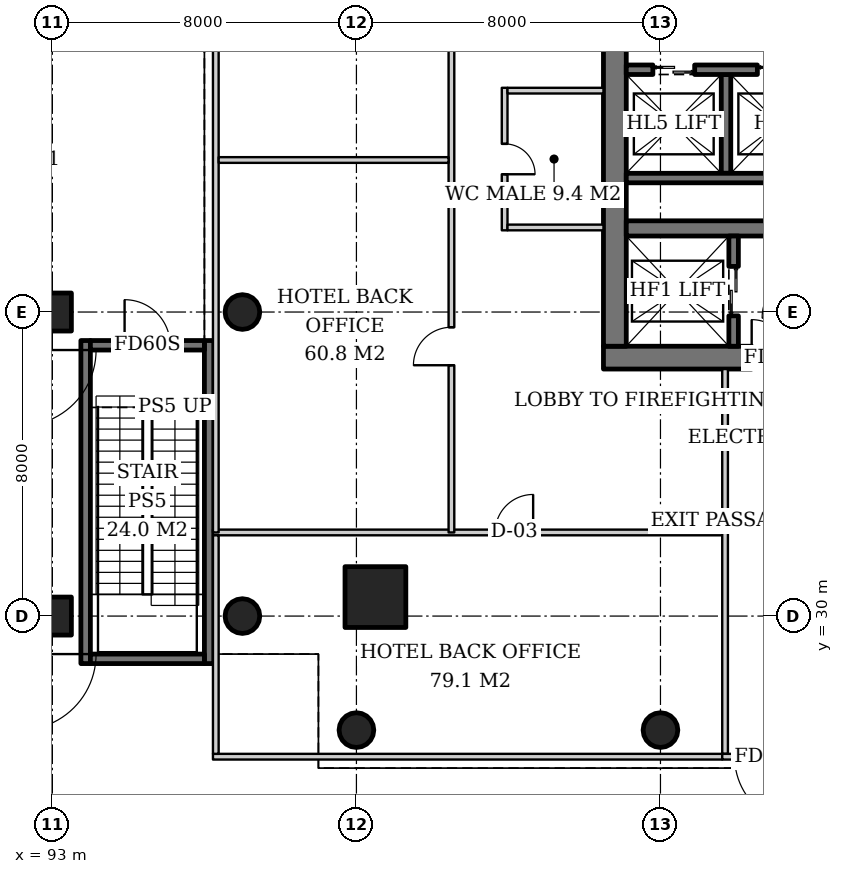
"""IFC4 building model, lengths in metres.
Left out: names, types, materials, properties, quantities, classifications, styles, units other than length and angle.
Written with IfcOpenShell. Run it as: python <this file> out.ifc"""

import sys

from ifc_helpers import new_model, si_unit, direction, frame, frame_2d, origin, origin_2d, place, context, subcontext, project, spatial, rectangle, hollow_circle, extrude, element, fill, save


model = new_model("IFC4")
c1 = context("Model", 3, precision=1e-05, world=origin(), true_north=direction((0.0, 1.0)))
c2 = subcontext(c1, "Body", "Model", "MODEL_VIEW")
j1 = project(units=[si_unit("LENGTHUNIT", "METRE"), si_unit("PLANEANGLEUNIT", "RADIAN")], contexts=[c1])
p1 = place(None, origin())
s1 = spatial("IfcSite", under=j1, at=p1, CompositionType="ELEMENT")
p2 = place(p1, origin())
s2 = spatial("IfcBuilding", under=s1, at=p2, CompositionType="ELEMENT")
p3 = place(p2, origin())
s3 = spatial("IfcBuildingStorey", under=s2, at=p3, CompositionType="ELEMENT", Elevation=0.0)
for number, where, z_axis, x_axis in (
    (1, (93.0, 30.0, 0.0), (0.0, 0.0, 1.0), (1.0, 0.0, 0.0)),
    (2, (93.0, 38.0, 0.0), (0.0, 0.0, 1.0), (1.0, 0.0, 0.0)),
):
    element("IfcColumn", number, at=place(p3, frame(where, z_axis=z_axis, x_axis=x_axis)), inside=s3, PredefinedType="COLUMN", context=c2, shape_type="SweptSolid", body=[
        extrude(rectangle(XDim=1.0, YDim=1.0, at=origin_2d()), origin(), (0.0, 0.0, 1.0), 6.0),
    ])
p4 = place(p3, frame((101.5, 30.5, 0.0), z_axis=(0.0, 0.0, 1.0), x_axis=(1.0, 0.0, 0.0)))
e3 = element("IfcColumn", 3, at=p4, inside=s3, PredefinedType="COLUMN", context=c2, shape_type="SweptSolid", body=[
    extrude(rectangle(XDim=1.6, YDim=1.6, at=origin_2d()), origin(), (0.0, 0.0, 1.0), 6.0),
])
for number, where, z_axis, x_axis in (
    (4, (98.0, 30.0, 0.0), (0.0, 0.0, 1.0), (1.0, 0.0, 0.0)),
    (5, (98.0, 38.0, 0.0), (0.0, 0.0, 1.0), (1.0, 0.0, 0.0)),
    (6, (101.0, 27.0, 0.0), (0.0, 0.0, 1.0), (1.0, 0.0, 0.0)),
    (7, (109.0, 27.0, 0.0), (0.0, 0.0, 1.0), (1.0, 0.0, 0.0)),
):
    element("IfcColumn", number, at=place(p3, frame(where, z_axis=z_axis, x_axis=x_axis)), inside=s3, PredefinedType="COLUMN", context=c2, shape_type="SweptSolid", body=[
        extrude(hollow_circle(Radius=0.457, WallThickness=0.03, at=origin_2d()), origin(), (0.0, 0.0, 1.0), 6.0),
    ])
p5 = place(p3, frame((107.5, 36.8, 0.0), z_axis=(0.0, 0.0, 1.0), x_axis=(1.0, 0.0, 0.0)))
e8 = element("IfcWall", 8, at=p5, inside=s3, PredefinedType="SHEAR", context=c2, shape_type="SweptSolid", body=[
    extrude(rectangle(XDim=19.0, YDim=0.6, at=frame_2d((9.5, 0.0))), origin(), (0.0, 0.0, 1.0), 6.0),
])
p6 = place(p5, frame((3.9, 0.0, 0.0)))
e9 = element("IfcOpeningElement", 9, at=p6, cuts=e8, PredefinedType="OPENING", context=c2, shape_type="SweptSolid", body=[
    extrude(rectangle(XDim=1.0, YDim=2.1, at=frame_2d((0.5, 1.05))), frame((0.0, 0.31, 0.0), z_axis=(0.0, -1.0, 0.0), x_axis=(1.0, 0.0, 0.0)), (0.0, 0.0, 1.0), 0.62),
])
p7 = place(p5, frame((14.107, 0.0, 0.0)))
e10 = element("IfcOpeningElement", 10, at=p7, cuts=e8, PredefinedType="OPENING", context=c2, shape_type="SweptSolid", body=[
    extrude(rectangle(XDim=1.0, YDim=2.1, at=frame_2d((0.5, 1.05))), frame((0.0, 0.31, 0.0), z_axis=(0.0, -1.0, 0.0), x_axis=(1.0, 0.0, 0.0)), (0.0, 0.0, 1.0), 0.62),
])
p8 = place(p5, frame((15.638, 0.0, 0.0)))
e11 = element("IfcOpeningElement", 11, at=p8, cuts=e8, PredefinedType="OPENING", context=c2, shape_type="SweptSolid", body=[
    extrude(rectangle(XDim=1.0, YDim=2.1, at=frame_2d((0.5, 1.05))), frame((0.0, 0.31, 0.0), z_axis=(0.0, -1.0, 0.0), x_axis=(1.0, 0.0, 0.0)), (0.0, 0.0, 1.0), 0.62),
])
p9 = place(p5, frame((17.142, 0.0, 0.0)))
e12 = element("IfcOpeningElement", 12, at=p9, cuts=e8, PredefinedType="OPENING", context=c2, shape_type="SweptSolid", body=[
    extrude(rectangle(XDim=1.0, YDim=2.1, at=frame_2d((0.5, 1.05))), frame((0.0, 0.31, 0.0), z_axis=(0.0, -1.0, 0.0), x_axis=(1.0, 0.0, 0.0)), (0.0, 0.0, 1.0), 0.62),
])
p10 = place(p3, frame((107.8, 37.1, 0.0), z_axis=(0.0, 0.0, 1.0), x_axis=(0.0, 1.0, 0.0)))
e13 = element("IfcWall", 13, at=p10, inside=s3, PredefinedType="SHEAR", context=c2, shape_type="SweptSolid", body=[
    extrude(rectangle(XDim=17.8, YDim=0.6, at=frame_2d((8.9, 0.0))), origin(), (0.0, 0.0, 1.0), 6.0),
])
p11 = place(p10, frame((8.0, 0.0, 0.0)))
e14 = element("IfcOpeningElement", 14, at=p11, cuts=e13, PredefinedType="OPENING", context=c2, shape_type="SweptSolid", body=[
    extrude(rectangle(XDim=1.8, YDim=2.4, at=frame_2d((0.9, 1.2))), frame((0.0, 0.31, 0.0), z_axis=(0.0, -1.0, 0.0), x_axis=(1.0, 0.0, 0.0)), (0.0, 0.0, 1.0), 0.62),
])
p12 = place(p3, frame((108.1, 40.2, 0.0), z_axis=(0.0, 0.0, 1.0), x_axis=(1.0, 0.0, 0.0)))
e15 = element("IfcWall", 15, at=p12, inside=s3, PredefinedType="SHEAR", context=c2, shape_type="SweptSolid", body=[
    extrude(rectangle(XDim=17.8, YDim=0.4, at=frame_2d((8.9, 0.0))), origin(), (0.0, 0.0, 1.0), 6.0),
])
p13 = place(p3, frame((110.925, 37.1, 0.0), z_axis=(0.0, 0.0, 1.0), x_axis=(0.0, 1.0, 0.0)))
e16 = element("IfcWall", 16, at=p13, inside=s3, PredefinedType="SHEAR", context=c2, shape_type="SweptSolid", body=[
    extrude(rectangle(XDim=2.9, YDim=0.25, at=frame_2d((1.45, 0.0))), origin(), (0.0, 0.0, 1.0), 6.0),
])
p14 = place(p13, frame((0.8, 0.0, 0.0)))
e17 = element("IfcOpeningElement", 17, at=p14, cuts=e16, PredefinedType="OPENING", context=c2, shape_type="SweptSolid", body=[
    extrude(rectangle(XDim=1.3, YDim=2.2, at=frame_2d((0.65, 1.1))), frame((0.0, 0.135, 0.0), z_axis=(0.0, -1.0, 0.0), x_axis=(1.0, 0.0, 0.0)), (0.0, 0.0, 1.0), 0.27),
])
p15 = place(p3, frame((110.725, 44.25, 0.0), z_axis=(0.0, 0.0, 1.0), x_axis=(0.0, -1.0, 0.0)))
e18 = element("IfcWall", 18, at=p15, inside=s3, PredefinedType="SHEAR", context=c2, shape_type="SweptSolid", body=[
    extrude(rectangle(XDim=2.6, YDim=0.25, at=frame_2d((1.3, 0.0))), origin(), (0.0, 0.0, 1.0), 6.0),
])
p16 = place(p3, frame((108.1, 41.525, 0.0), z_axis=(0.0, 0.0, 1.0), x_axis=(1.0, 0.0, 0.0)))
e19 = element("IfcWall", 19, at=p16, inside=s3, PredefinedType="SHEAR", context=c2, shape_type="SweptSolid", body=[
    extrude(rectangle(XDim=11.0, YDim=0.25, at=frame_2d((5.5, 0.0))), origin(), (0.0, 0.0, 1.0), 6.0),
])
p17 = place(p3, frame((108.1, 44.375, 0.0), z_axis=(0.0, 0.0, 1.0), x_axis=(1.0, 0.0, 0.0)))
e20 = element("IfcWall", 20, at=p17, inside=s3, PredefinedType="SHEAR", context=c2, shape_type="SweptSolid", body=[
    extrude(rectangle(XDim=12.83, YDim=0.25, at=frame_2d((6.415, 0.0))), origin(), (0.0, 0.0, 1.0), 6.0),
])
p18 = place(p17, frame((0.7, 0.0, 0.0)))
e21 = element("IfcOpeningElement", 21, at=p18, cuts=e20, PredefinedType="OPENING", context=c2, shape_type="SweptSolid", body=[
    extrude(rectangle(XDim=1.1, YDim=2.2, at=frame_2d((0.55, 1.1))), frame((0.0, 0.135, 0.0), z_axis=(0.0, -1.0, 0.0), x_axis=(1.0, 0.0, 0.0)), (0.0, 0.0, 1.0), 0.27),
])
p19 = place(p17, frame((3.45, 0.0, 0.0)))
e22 = element("IfcOpeningElement", 22, at=p19, cuts=e20, PredefinedType="OPENING", context=c2, shape_type="SweptSolid", body=[
    extrude(rectangle(XDim=1.1, YDim=2.2, at=frame_2d((0.55, 1.1))), frame((0.0, 0.135, 0.0), z_axis=(0.0, -1.0, 0.0), x_axis=(1.0, 0.0, 0.0)), (0.0, 0.0, 1.0), 0.27),
])
p20 = place(p17, frame((6.2, 0.0, 0.0)))
e23 = element("IfcOpeningElement", 23, at=p20, cuts=e20, PredefinedType="OPENING", context=c2, shape_type="SweptSolid", body=[
    extrude(rectangle(XDim=1.1, YDim=2.2, at=frame_2d((0.55, 1.1))), frame((0.0, 0.135, 0.0), z_axis=(0.0, -1.0, 0.0), x_axis=(1.0, 0.0, 0.0)), (0.0, 0.0, 1.0), 0.27),
])
p21 = place(p17, frame((9.0, 0.0, 0.0)))
e24 = element("IfcOpeningElement", 24, at=p21, cuts=e20, PredefinedType="OPENING", context=c2, shape_type="SweptSolid", body=[
    extrude(rectangle(XDim=1.0, YDim=2.1, at=frame_2d((0.5, 1.05))), frame((0.0, 0.135, 0.0), z_axis=(0.0, -1.0, 0.0), x_axis=(1.0, 0.0, 0.0)), (0.0, 0.0, 1.0), 0.27),
])
p22 = place(p17, frame((11.515, 0.0, 0.0)))
e25 = element("IfcOpeningElement", 25, at=p22, cuts=e20, PredefinedType="OPENING", context=c2, shape_type="SweptSolid", body=[
    extrude(rectangle(XDim=0.8, YDim=2.0, at=frame_2d((0.4, 1.0))), frame((0.0, 0.135, 0.0), z_axis=(0.0, -1.0, 0.0), x_axis=(1.0, 0.0, 0.0)), (0.0, 0.0, 1.0), 0.27),
])
for number, where, z_axis, x_axis in (
    (26, (93.875, 28.75, 0.0), (0.0, 0.0, 1.0), (0.0, 1.0, 0.0)),
    (27, (97.125, 28.75, 0.0), (0.0, 0.0, 1.0), (0.0, 1.0, 0.0)),
):
    element("IfcWall", number, at=place(p3, frame(where, z_axis=z_axis, x_axis=x_axis)), inside=s3, PredefinedType="SOLIDWALL", context=c2, shape_type="SweptSolid", body=[
        extrude(rectangle(XDim=8.5, YDim=0.25, at=frame_2d((4.25, 0.0))), origin(), (0.0, 0.0, 1.0), 5.7),
    ])
p23 = place(p3, frame((94.0, 28.875, 0.0), z_axis=(0.0, 0.0, 1.0), x_axis=(1.0, 0.0, 0.0)))
e28 = element("IfcWall", 28, at=p23, inside=s3, PredefinedType="SOLIDWALL", context=c2, shape_type="SweptSolid", body=[
    extrude(rectangle(XDim=3.0, YDim=0.25, at=frame_2d((1.5, 0.0))), origin(), (0.0, 0.0, 1.0), 5.7),
])
p24 = place(p3, frame((94.0, 37.125, 0.0), z_axis=(0.0, 0.0, 1.0), x_axis=(1.0, 0.0, 0.0)))
e29 = element("IfcWall", 29, at=p24, inside=s3, PredefinedType="SOLIDWALL", context=c2, shape_type="SweptSolid", body=[
    extrude(rectangle(XDim=3.0, YDim=0.25, at=frame_2d((1.5, 0.0))), origin(), (0.0, 0.0, 1.0), 5.7),
])
p25 = place(p24, frame((0.9, 0.0, 0.0)))
e30 = element("IfcOpeningElement", 30, at=p25, cuts=e29, PredefinedType="OPENING", context=c2, shape_type="SweptSolid", body=[
    extrude(rectangle(XDim=1.2, YDim=2.1, at=frame_2d((0.6, 1.05))), frame((0.0, 0.135, 0.0), z_axis=(0.0, -1.0, 0.0), x_axis=(1.0, 0.0, 0.0)), (0.0, 0.0, 1.0), 0.27),
])
p26 = place(p3, frame((104.9, 43.9, 0.0), z_axis=(0.0, 0.0, 1.0), x_axis=(0.0, -1.0, 0.0)))
e31 = element("IfcWall", 31, at=p26, inside=s3, PredefinedType="PARTITIONING", context=c2, shape_type="SweptSolid", body=[
    extrude(rectangle(XDim=3.75, YDim=0.15, at=frame_2d((1.875, 0.0))), origin(), (0.0, 0.0, 1.0), 4.947),
])
p27 = place(p26, frame((1.475, 0.0, 0.0)))
e32 = element("IfcOpeningElement", 32, at=p27, cuts=e31, PredefinedType="OPENING", context=c2, shape_type="SweptSolid", body=[
    extrude(rectangle(XDim=0.8, YDim=2.1, at=frame_2d((0.4, 1.05))), frame((0.0, 0.085, 0.0), z_axis=(0.0, -1.0, 0.0), x_axis=(1.0, 0.0, 0.0)), (0.0, 0.0, 1.0), 0.17),
])
for number, where, z_axis, x_axis in (
    (33, (104.975, 43.825, 0.0), (0.0, 0.0, 1.0), (1.0, 0.0, 0.0)),
    (34, (104.975, 40.225, 0.0), (0.0, 0.0, 1.0), (1.0, 0.0, 0.0)),
):
    element("IfcWall", number, at=place(p3, frame(where, z_axis=z_axis, x_axis=x_axis)), inside=s3, PredefinedType="PARTITIONING", context=c2, shape_type="SweptSolid", body=[
        extrude(rectangle(XDim=2.525, YDim=0.15, at=frame_2d((1.262, 0.0))), origin(), (0.0, 0.0, 1.0), 5.7),
    ])
p28 = place(p3, frame((97.225, 26.3, 0.0), z_axis=(0.0, 0.0, 1.0), x_axis=(1.0, 0.0, 0.0)))
e35 = element("IfcWall", 35, at=p28, inside=s3, PredefinedType="PARTITIONING", context=c2, shape_type="SweptSolid", body=[
    extrude(rectangle(XDim=13.4, YDim=0.15, at=frame_2d((6.7, 0.0))), origin(), (0.0, 0.0, 1.0), 5.7),
])
p29 = place(p3, frame((97.225, 32.2, 0.0), z_axis=(0.0, 0.0, 1.0), x_axis=(1.0, 0.0, 0.0)))
e36 = element("IfcWall", 36, at=p29, inside=s3, PredefinedType="PARTITIONING", context=c2, shape_type="SweptSolid", body=[
    extrude(rectangle(XDim=13.4, YDim=0.15, at=frame_2d((6.7, 0.0))), origin(), (0.0, 0.0, 1.0), 4.9),
])
p30 = place(p29, frame((7.425, 0.0, 0.0)))
e37 = element("IfcOpeningElement", 37, at=p30, cuts=e36, PredefinedType="OPENING", context=c2, shape_type="SweptSolid", body=[
    extrude(rectangle(XDim=1.0, YDim=2.1, at=frame_2d((0.5, 1.05))), frame((0.0, 0.085, 0.0), z_axis=(0.0, -1.0, 0.0), x_axis=(1.0, 0.0, 0.0)), (0.0, 0.0, 1.0), 0.17),
])
p31 = place(p3, frame((97.3, 26.375, 0.0), z_axis=(0.0, 0.0, 1.0), x_axis=(0.0, 1.0, 0.0)))
e38 = element("IfcWall", 38, at=p31, inside=s3, PredefinedType="PARTITIONING", context=c2, shape_type="SweptSolid", body=[
    extrude(rectangle(XDim=5.75, YDim=0.15, at=frame_2d((2.875, 0.0))), origin(), (0.0, 0.0, 1.0), 5.7),
])
p32 = place(p3, frame((97.3, 32.2, 0.0), z_axis=(0.0, 0.0, 1.0), x_axis=(0.0, 1.0, 0.0)))
e39 = element("IfcWall", 39, at=p32, inside=s3, PredefinedType="PARTITIONING", context=c2, shape_type="SweptSolid", body=[
    extrude(rectangle(XDim=27.6, YDim=0.15, at=frame_2d((13.8, 0.0))), origin(), (0.0, 0.0, 1.0), 5.7),
])
p33 = place(p3, frame((103.5, 32.2, 0.0), z_axis=(0.0, 0.0, 1.0), x_axis=(0.0, 1.0, 0.0)))
e40 = element("IfcWall", 40, at=p33, inside=s3, PredefinedType="PARTITIONING", context=c2, shape_type="SweptSolid", body=[
    extrude(rectangle(XDim=27.6, YDim=0.15, at=frame_2d((13.8, 0.0))), origin(), (0.0, 0.0, 1.0), 4.9),
])
p34 = place(p33, frame((4.4, 0.0, 0.0)))
e41 = element("IfcOpeningElement", 41, at=p34, cuts=e40, PredefinedType="OPENING", context=c2, shape_type="SweptSolid", body=[
    extrude(rectangle(XDim=1.0, YDim=2.1, at=frame_2d((0.5, 1.05))), frame((0.0, 0.085, 0.0), z_axis=(0.0, -1.0, 0.0), x_axis=(1.0, 0.0, 0.0)), (0.0, 0.0, 1.0), 0.17),
])
p35 = place(p33, frame((13.3, 0.0, 0.0)))
e42 = element("IfcOpeningElement", 42, at=p35, cuts=e40, PredefinedType="OPENING", context=c2, shape_type="SweptSolid", body=[
    extrude(rectangle(XDim=1.0, YDim=2.1, at=frame_2d((0.5, 1.05))), frame((0.0, 0.085, 0.0), z_axis=(0.0, -1.0, 0.0), x_axis=(1.0, 0.0, 0.0)), (0.0, 0.0, 1.0), 0.17),
])
p36 = place(p33, frame((22.2, 0.0, 0.0)))
e43 = element("IfcOpeningElement", 43, at=p36, cuts=e40, PredefinedType="OPENING", context=c2, shape_type="SweptSolid", body=[
    extrude(rectangle(XDim=1.0, YDim=2.1, at=frame_2d((0.5, 1.05))), frame((0.0, 0.085, 0.0), z_axis=(0.0, -1.0, 0.0), x_axis=(1.0, 0.0, 0.0)), (0.0, 0.0, 1.0), 0.17),
])
p37 = place(p3, frame((97.375, 42.0, 0.0), z_axis=(0.0, 0.0, 1.0), x_axis=(1.0, 0.0, 0.0)))
e44 = element("IfcWall", 44, at=p37, inside=s3, PredefinedType="PARTITIONING", context=c2, shape_type="SweptSolid", body=[
    extrude(rectangle(XDim=6.05, YDim=0.15, at=frame_2d((3.025, 0.0))), origin(), (0.0, 0.0, 1.0), 5.15),
])
p38 = place(p3, frame((110.7, 26.375, 0.0), z_axis=(0.0, 0.0, 1.0), x_axis=(0.0, 1.0, 0.0)))
e45 = element("IfcWall", 45, at=p38, inside=s3, PredefinedType="SOLIDWALL", context=c2, shape_type="SweptSolid", body=[
    extrude(rectangle(XDim=10.125, YDim=0.15, at=frame_2d((5.062, 0.0))), origin(), (0.0, 0.0, 1.0), 5.15),
])
p39 = place(p3, frame((113.075, 26.3, 0.0), z_axis=(0.0, 0.0, 1.0), x_axis=(-1.0, 0.0, 0.0)))
e46 = element("IfcWall", 46, at=p39, inside=s3, PredefinedType="SOLIDWALL", context=c2, shape_type="SweptSolid", body=[
    extrude(rectangle(XDim=2.45, YDim=0.15, at=frame_2d((1.225, 0.0))), origin(), (0.0, 0.0, 1.0), 5.7),
])
p40 = place(p39, frame((0.325, 0.0, 0.0)))
e47 = element("IfcOpeningElement", 47, at=p40, cuts=e46, PredefinedType="OPENING", context=c2, shape_type="SweptSolid", body=[
    extrude(rectangle(XDim=1.8, YDim=2.4, at=frame_2d((0.9, 1.2))), frame((0.0, 0.085, 0.0), z_axis=(0.0, -1.0, 0.0), x_axis=(1.0, 0.0, 0.0)), (0.0, 0.0, 1.0), 0.17),
])
p41 = place(p14, origin())
e48 = element("IfcDoor", 48, at=p41, inside=s3, OperationType="DOUBLE_DOOR_SLIDING", PredefinedType="DOOR", context=c2, shape_type="SweptSolid", body=[
    extrude(rectangle(XDim=1.3, YDim=2.2, at=frame_2d((0.65, 1.1))), frame((0.0, 0.025, 0.0), z_axis=(0.0, -1.0, 0.0), x_axis=(1.0, 0.0, 0.0)), (0.0, 0.0, 1.0), 0.05),
])
fill(e17, e48)
p42 = place(p18, origin())
e49 = element("IfcDoor", 49, at=p42, inside=s3, OperationType="DOUBLE_DOOR_SLIDING", PredefinedType="DOOR", context=c2, shape_type="SweptSolid", body=[
    extrude(rectangle(XDim=1.1, YDim=2.2, at=frame_2d((0.55, 1.1))), frame((0.0, 0.025, 0.0), z_axis=(0.0, -1.0, 0.0), x_axis=(1.0, 0.0, 0.0)), (0.0, 0.0, 1.0), 0.05),
])
fill(e21, e49)
p43 = place(p19, origin())
e50 = element("IfcDoor", 50, at=p43, inside=s3, OperationType="DOUBLE_DOOR_SLIDING", PredefinedType="DOOR", context=c2, shape_type="SweptSolid", body=[
    extrude(rectangle(XDim=1.1, YDim=2.2, at=frame_2d((0.55, 1.1))), frame((0.0, 0.025, 0.0), z_axis=(0.0, -1.0, 0.0), x_axis=(1.0, 0.0, 0.0)), (0.0, 0.0, 1.0), 0.05),
])
fill(e22, e50)
p44 = place(p6, origin())
e51 = element("IfcDoor", 51, at=p44, inside=s3, OperationType="SINGLE_SWING_LEFT", PredefinedType="DOOR", context=c2, shape_type="SweptSolid", body=[
    extrude(rectangle(XDim=1.0, YDim=2.1, at=frame_2d((0.5, 1.05))), frame((0.0, 0.025, 0.0), z_axis=(0.0, -1.0, 0.0), x_axis=(1.0, 0.0, 0.0)), (0.0, 0.0, 1.0), 0.05),
])
fill(e9, e51)
p45 = place(p25, origin())
e52 = element("IfcDoor", 52, at=p45, inside=s3, OperationType="SINGLE_SWING_LEFT", PredefinedType="DOOR", context=c2, shape_type="SweptSolid", body=[
    extrude(rectangle(XDim=1.2, YDim=2.1, at=frame_2d((0.6, 1.05))), frame((0.0, 0.025, 0.0), z_axis=(0.0, -1.0, 0.0), x_axis=(1.0, 0.0, 0.0)), (0.0, 0.0, 1.0), 0.05),
])
fill(e30, e52)
p46 = place(p27, origin())
e53 = element("IfcDoor", 53, at=p46, inside=s3, OperationType="SINGLE_SWING_RIGHT", PredefinedType="DOOR", context=c2, shape_type="SweptSolid", body=[
    extrude(rectangle(XDim=0.8, YDim=2.1, at=frame_2d((0.4, 1.05))), frame((0.0, 0.025, 0.0), z_axis=(0.0, -1.0, 0.0), x_axis=(1.0, 0.0, 0.0)), (0.0, 0.0, 1.0), 0.05),
])
fill(e32, e53)
p47 = place(p30, origin())
e54 = element("IfcDoor", 54, at=p47, inside=s3, OperationType="SINGLE_SWING_RIGHT", PredefinedType="DOOR", context=c2, shape_type="SweptSolid", body=[
    extrude(rectangle(XDim=1.0, YDim=2.1, at=frame_2d((0.5, 1.05))), frame((0.0, 0.025, 0.0), z_axis=(0.0, -1.0, 0.0), x_axis=(1.0, 0.0, 0.0)), (0.0, 0.0, 1.0), 0.05),
])
fill(e37, e54)
p48 = place(p34, origin())
e55 = element("IfcDoor", 55, at=p48, inside=s3, OperationType="SINGLE_SWING_LEFT", PredefinedType="DOOR", context=c2, shape_type="SweptSolid", body=[
    extrude(rectangle(XDim=1.0, YDim=2.1, at=frame_2d((0.5, 1.05))), frame((0.0, 0.025, 0.0), z_axis=(0.0, -1.0, 0.0), x_axis=(1.0, 0.0, 0.0)), (0.0, 0.0, 1.0), 0.05),
])
fill(e41, e55)
p49 = place(p40, origin())
e56 = element("IfcDoor", 56, at=p49, inside=s3, OperationType="DOUBLE_DOOR_SINGLE_SWING", PredefinedType="DOOR", context=c2, shape_type="SweptSolid", body=[
    extrude(rectangle(XDim=1.8, YDim=2.4, at=frame_2d((0.9, 1.2))), frame((0.0, 0.025, 0.0), z_axis=(0.0, -1.0, 0.0), x_axis=(1.0, 0.0, 0.0)), (0.0, 0.0, 1.0), 0.05),
])
fill(e47, e56)
save(model, sys.argv[1])
